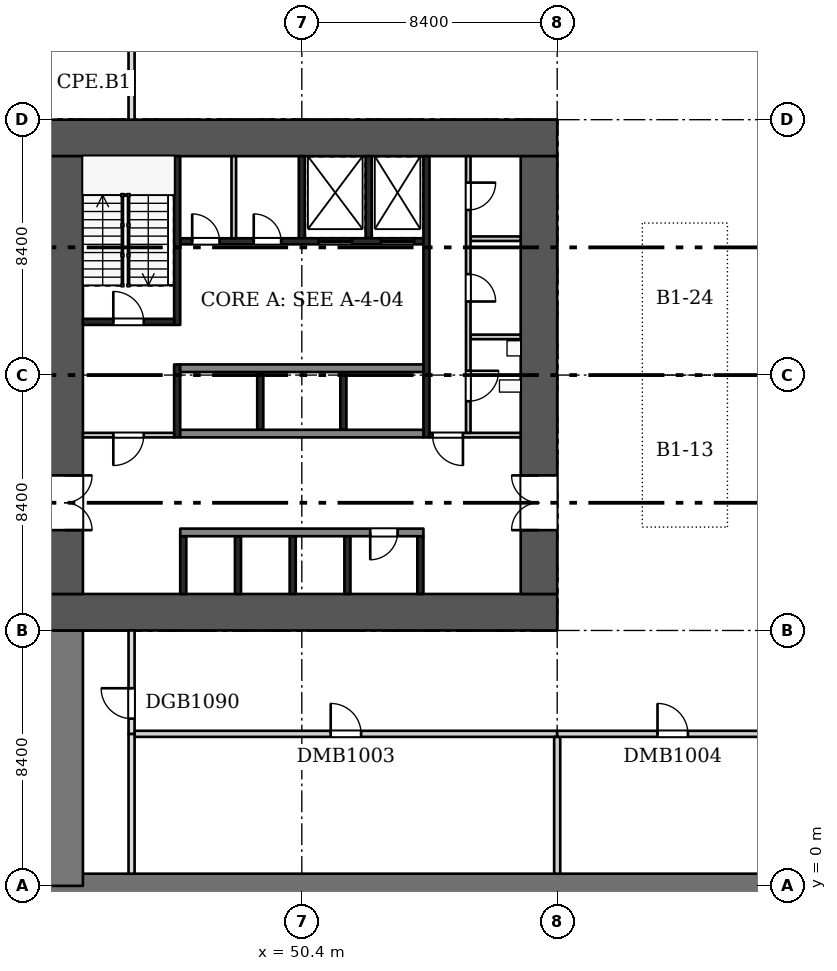
"""IFC4 building model, lengths in metres.
Left out: names, types, materials, properties, quantities, classifications, styles, units other than length and angle.
Written with IfcOpenShell. Run it as: python <this file> out.ifc"""

import sys

from ifc_helpers import new_model, si_unit, direction, frame, frame_2d, origin, place, context, subcontext, project, spatial, rectangle, extrude, element, fill, save


model = new_model("IFC4")
c1 = context("Model", 3, precision=1e-05, world=origin(), true_north=direction((0.0, 1.0)))
c2 = subcontext(c1, "Body", "Model", "MODEL_VIEW")
j1 = project(units=[si_unit("LENGTHUNIT", "METRE"), si_unit("PLANEANGLEUNIT", "RADIAN")], contexts=[c1])
p1 = place(None, origin())
s1 = spatial("IfcSite", under=j1, at=p1, CompositionType="ELEMENT")
p2 = place(p1, origin())
s2 = spatial("IfcBuilding", under=s1, at=p2, CompositionType="ELEMENT")
p3 = place(p2, frame((0.0, 0.0, -4.0)))
s3 = spatial("IfcBuildingStorey", under=s2, at=p3, CompositionType="ELEMENT", Elevation=-4.0)
p4 = place(p3, frame((-8.8, 0.0, 0.0), z_axis=(0.0, 0.0, 1.0), x_axis=(1.0, 0.0, 0.0)))
e1 = element("IfcWall", 1, at=p4, inside=s3, PredefinedType="SOLIDWALL", context=c2, shape_type="SweptSolid", body=[
    extrude(rectangle(XDim=76.0, YDim=0.8, at=frame_2d((38.0, 0.0))), origin(), (0.0, 0.0, 1.0), 3.6),
])
p5 = place(p3, frame((42.6, 0.0, 0.0), z_axis=(0.0, 0.0, 1.0), x_axis=(0.0, 1.0, 0.0)))
e2 = element("IfcWall", 2, at=p5, inside=s3, PredefinedType="SHEAR", context=c2, shape_type="SweptSolid", body=[
    extrude(rectangle(XDim=8.4, YDim=1.2, at=frame_2d((4.2, 0.0))), origin(), (0.0, 0.0, 1.0), 3.6),
])
for number, where, z_axis, x_axis in (
    (3, (42.0, 9.0, 0.0), (0.0, 0.0, 1.0), (1.0, 0.0, 0.0)),
    (4, (42.0, 24.6, 0.0), (0.0, 0.0, 1.0), (1.0, 0.0, 0.0)),
):
    element("IfcWall", number, at=place(p3, frame(where, z_axis=z_axis, x_axis=x_axis)), inside=s3, PredefinedType="SHEAR", context=c2, shape_type="SweptSolid", body=[
        extrude(rectangle(XDim=16.8, YDim=1.2, at=frame_2d((8.4, 0.0))), origin(), (0.0, 0.0, 1.0), 3.6),
    ])
p6 = place(p3, frame((42.6, 9.6, 0.0), z_axis=(0.0, 0.0, 1.0), x_axis=(0.0, 1.0, 0.0)))
e5 = element("IfcWall", 5, at=p6, inside=s3, PredefinedType="SHEAR", context=c2, shape_type="SweptSolid", body=[
    extrude(rectangle(XDim=14.4, YDim=1.2, at=frame_2d((7.2, 0.0))), origin(), (0.0, 0.0, 1.0), 3.6),
])
p7 = place(p6, frame((2.1, 0.0, 0.0)))
e6 = element("IfcOpeningElement", 6, at=p7, cuts=e5, PredefinedType="OPENING", context=c2, shape_type="SweptSolid", body=[
    extrude(rectangle(XDim=1.8, YDim=2.1, at=frame_2d((0.9, 1.05))), frame((0.0, 0.61, 0.0), z_axis=(0.0, -1.0, 0.0), x_axis=(1.0, 0.0, 0.0)), (0.0, 0.0, 1.0), 1.22),
])
p8 = place(p3, frame((58.2, 9.6, 0.0), z_axis=(0.0, 0.0, 1.0), x_axis=(0.0, 1.0, 0.0)))
e7 = element("IfcWall", 7, at=p8, inside=s3, PredefinedType="SHEAR", context=c2, shape_type="SweptSolid", body=[
    extrude(rectangle(XDim=14.4, YDim=1.2, at=frame_2d((7.2, 0.0))), origin(), (0.0, 0.0, 1.0), 3.6),
])
p9 = place(p8, frame((2.1, 0.0, 0.0)))
e8 = element("IfcOpeningElement", 8, at=p9, cuts=e7, PredefinedType="OPENING", context=c2, shape_type="SweptSolid", body=[
    extrude(rectangle(XDim=1.8, YDim=2.1, at=frame_2d((0.9, 1.05))), frame((0.0, 0.61, 0.0), z_axis=(0.0, -1.0, 0.0), x_axis=(1.0, 0.0, 0.0)), (0.0, 0.0, 1.0), 1.22),
])
for number, where, z_axis, x_axis in (
    (9, (46.5, 9.6, 0.0), (0.0, 0.0, 1.0), (0.0, 1.0, 0.0)),
    (10, (48.3, 9.6, 0.0), (0.0, 0.0, 1.0), (0.0, 1.0, 0.0)),
    (11, (50.1, 9.6, 0.0), (0.0, 0.0, 1.0), (0.0, 1.0, 0.0)),
    (12, (51.9, 9.6, 0.0), (0.0, 0.0, 1.0), (0.0, 1.0, 0.0)),
    (13, (54.3, 9.6, 0.0), (0.0, 0.0, 1.0), (0.0, 1.0, 0.0)),
):
    element("IfcWall", number, at=place(p3, frame(where, z_axis=z_axis, x_axis=x_axis)), inside=s3, PredefinedType="SHEAR", context=c2, shape_type="SweptSolid", body=[
        extrude(rectangle(XDim=1.9, YDim=0.2, at=frame_2d((0.95, 0.0))), origin(), (0.0, 0.0, 1.0), 3.6),
    ])
p10 = place(p3, frame((46.4, 11.625, 0.0), z_axis=(0.0, 0.0, 1.0), x_axis=(1.0, 0.0, 0.0)))
e14 = element("IfcWall", 14, at=p10, inside=s3, PredefinedType="SHEAR", context=c2, shape_type="SweptSolid", body=[
    extrude(rectangle(XDim=8.0, YDim=0.25, at=frame_2d((4.0, 0.0))), origin(), (0.0, 0.0, 1.0), 3.6),
])
p11 = place(p10, frame((6.25, 0.0, 0.0)))
e15 = element("IfcOpeningElement", 15, at=p11, cuts=e14, PredefinedType="OPENING", context=c2, shape_type="SweptSolid", body=[
    extrude(rectangle(XDim=0.9, YDim=2.1, at=frame_2d((0.45, 1.05))), frame((0.0, 0.135, 0.0), z_axis=(0.0, -1.0, 0.0), x_axis=(1.0, 0.0, 0.0)), (0.0, 0.0, 1.0), 0.27),
])
for number, where, z_axis, x_axis in (
    (16, (49.033, 15.0, 0.0), (0.0, 0.0, 1.0), (0.0, 1.0, 0.0)),
    (17, (51.767, 15.0, 0.0), (0.0, 0.0, 1.0), (0.0, 1.0, 0.0)),
):
    element("IfcWall", number, at=place(p3, frame(where, z_axis=z_axis, x_axis=x_axis)), inside=s3, PredefinedType="SHEAR", context=c2, shape_type="SweptSolid", body=[
        extrude(rectangle(XDim=1.9, YDim=0.2, at=frame_2d((0.95, 0.0))), origin(), (0.0, 0.0, 1.0), 3.6),
    ])
for number, where, z_axis, x_axis in (
    (18, (46.4, 14.875, 0.0), (0.0, 0.0, 1.0), (1.0, 0.0, 0.0)),
    (19, (46.4, 17.025, 0.0), (0.0, 0.0, 1.0), (1.0, 0.0, 0.0)),
):
    element("IfcWall", number, at=place(p3, frame(where, z_axis=z_axis, x_axis=x_axis)), inside=s3, PredefinedType="SHEAR", context=c2, shape_type="SweptSolid", body=[
        extrude(rectangle(XDim=8.0, YDim=0.25, at=frame_2d((4.0, 0.0))), origin(), (0.0, 0.0, 1.0), 3.6),
    ])
for number, where, z_axis, x_axis in (
    (20, (50.4, 21.3, 0.0), (0.0, 0.0, 1.0), (0.0, 1.0, 0.0)),
    (21, (52.6, 21.3, 0.0), (0.0, 0.0, 1.0), (0.0, 1.0, 0.0)),
):
    element("IfcWall", number, at=place(p3, frame(where, z_axis=z_axis, x_axis=x_axis)), inside=s3, PredefinedType="SHEAR", context=c2, shape_type="SweptSolid", body=[
        extrude(rectangle(XDim=2.7, YDim=0.2, at=frame_2d((1.35, 0.0))), origin(), (0.0, 0.0, 1.0), 3.6),
    ])
p12 = place(p3, frame((48.163, 21.3, 0.0), z_axis=(0.0, 0.0, 1.0), x_axis=(0.0, 1.0, 0.0)))
e22 = element("IfcWall", 22, at=p12, inside=s3, PredefinedType="PARTITIONING", context=c2, shape_type="SweptSolid", body=[
    extrude(rectangle(XDim=2.7, YDim=0.15, at=frame_2d((1.35, 0.0))), origin(), (0.0, 0.0, 1.0), 3.6),
])
p13 = place(p3, frame((46.4, 21.2, 0.0), z_axis=(0.0, 0.0, 1.0), x_axis=(1.0, 0.0, 0.0)))
e23 = element("IfcWall", 23, at=p13, inside=s3, PredefinedType="SHEAR", context=c2, shape_type="SweptSolid", body=[
    extrude(rectangle(XDim=8.0, YDim=0.2, at=frame_2d((4.0, 0.0))), origin(), (0.0, 0.0, 1.0), 3.6),
])
p14 = place(p13, frame((0.394, 0.0, 0.0)))
e24 = element("IfcOpeningElement", 24, at=p14, cuts=e23, PredefinedType="OPENING", context=c2, shape_type="SweptSolid", body=[
    extrude(rectangle(XDim=0.9, YDim=2.1, at=frame_2d((0.45, 1.05))), frame((0.0, 0.11, 0.0), z_axis=(0.0, -1.0, 0.0), x_axis=(1.0, 0.0, 0.0)), (0.0, 0.0, 1.0), 0.22),
])
p15 = place(p13, frame((2.419, 0.0, 0.0)))
e25 = element("IfcOpeningElement", 25, at=p15, cuts=e23, PredefinedType="OPENING", context=c2, shape_type="SweptSolid", body=[
    extrude(rectangle(XDim=0.9, YDim=2.1, at=frame_2d((0.45, 1.05))), frame((0.0, 0.11, 0.0), z_axis=(0.0, -1.0, 0.0), x_axis=(1.0, 0.0, 0.0)), (0.0, 0.0, 1.0), 0.22),
])
p16 = place(p13, frame((4.55, 0.0, 0.0)))
e26 = element("IfcOpeningElement", 26, at=p16, cuts=e23, PredefinedType="OPENING", context=c2, shape_type="SweptSolid", body=[
    extrude(rectangle(XDim=1.1, YDim=2.1, at=frame_2d((0.55, 1.05))), frame((0.0, 0.11, 0.0), z_axis=(0.0, -1.0, 0.0), x_axis=(1.0, 0.0, 0.0)), (0.0, 0.0, 1.0), 0.22),
])
p17 = place(p13, frame((6.6, 0.0, 0.0)))
e27 = element("IfcOpeningElement", 27, at=p17, cuts=e23, PredefinedType="OPENING", context=c2, shape_type="SweptSolid", body=[
    extrude(rectangle(XDim=1.1, YDim=2.1, at=frame_2d((0.55, 1.05))), frame((0.0, 0.11, 0.0), z_axis=(0.0, -1.0, 0.0), x_axis=(1.0, 0.0, 0.0)), (0.0, 0.0, 1.0), 0.22),
])
p18 = place(p3, frame((46.3, 14.75, 0.0), z_axis=(0.0, 0.0, 1.0), x_axis=(0.0, 1.0, 0.0)))
e28 = element("IfcWall", 28, at=p18, inside=s3, PredefinedType="SHEAR", context=c2, shape_type="SweptSolid", body=[
    extrude(rectangle(XDim=2.4, YDim=0.2, at=frame_2d((1.2, 0.0))), origin(), (0.0, 0.0, 1.0), 3.6),
])
p19 = place(p3, frame((46.3, 18.45, 0.0), z_axis=(0.0, 0.0, 1.0), x_axis=(0.0, 1.0, 0.0)))
e29 = element("IfcWall", 29, at=p19, inside=s3, PredefinedType="SHEAR", context=c2, shape_type="SweptSolid", body=[
    extrude(rectangle(XDim=5.55, YDim=0.2, at=frame_2d((2.775, 0.0))), origin(), (0.0, 0.0, 1.0), 3.6),
])
p20 = place(p3, frame((43.2, 14.825, 0.0), z_axis=(0.0, 0.0, 1.0), x_axis=(1.0, 0.0, 0.0)))
e30 = element("IfcWall", 30, at=p20, inside=s3, PredefinedType="PARTITIONING", context=c2, shape_type="SweptSolid", body=[
    extrude(rectangle(XDim=3.0, YDim=0.15, at=frame_2d((1.5, 0.0))), origin(), (0.0, 0.0, 1.0), 3.6),
])
p21 = place(p20, frame((1.0, 0.0, 0.0)))
e31 = element("IfcOpeningElement", 31, at=p21, cuts=e30, PredefinedType="OPENING", context=c2, shape_type="SweptSolid", body=[
    extrude(rectangle(XDim=1.0, YDim=2.1, at=frame_2d((0.5, 1.05))), frame((0.0, 0.085, 0.0), z_axis=(0.0, -1.0, 0.0), x_axis=(1.0, 0.0, 0.0)), (0.0, 0.0, 1.0), 0.17),
])
p22 = place(p3, frame((43.2, 18.55, 0.0), z_axis=(0.0, 0.0, 1.0), x_axis=(1.0, 0.0, 0.0)))
e32 = element("IfcWall", 32, at=p22, inside=s3, PredefinedType="SHEAR", context=c2, shape_type="SweptSolid", body=[
    extrude(rectangle(XDim=3.0, YDim=0.2, at=frame_2d((1.5, 0.0))), origin(), (0.0, 0.0, 1.0), 3.6),
])
p23 = place(p22, frame((1.0, 0.0, 0.0)))
e33 = element("IfcOpeningElement", 33, at=p23, cuts=e32, PredefinedType="OPENING", context=c2, shape_type="SweptSolid", body=[
    extrude(rectangle(XDim=1.0, YDim=2.1, at=frame_2d((0.5, 1.05))), frame((0.0, 0.11, 0.0), z_axis=(0.0, -1.0, 0.0), x_axis=(1.0, 0.0, 0.0)), (0.0, 0.0, 1.0), 0.22),
])
p24 = place(p3, frame((54.5, 14.75, 0.0), z_axis=(0.0, 0.0, 1.0), x_axis=(0.0, 1.0, 0.0)))
e34 = element("IfcWall", 34, at=p24, inside=s3, PredefinedType="SHEAR", context=c2, shape_type="SweptSolid", body=[
    extrude(rectangle(XDim=9.25, YDim=0.2, at=frame_2d((4.625, 0.0))), origin(), (0.0, 0.0, 1.0), 3.6),
])
p25 = place(p3, frame((54.6, 14.825, 0.0), z_axis=(0.0, 0.0, 1.0), x_axis=(1.0, 0.0, 0.0)))
e35 = element("IfcWall", 35, at=p25, inside=s3, PredefinedType="PARTITIONING", context=c2, shape_type="SweptSolid", body=[
    extrude(rectangle(XDim=3.0, YDim=0.15, at=frame_2d((1.5, 0.0))), origin(), (0.0, 0.0, 1.0), 3.6),
])
p26 = place(p25, frame((0.1, 0.0, 0.0)))
e36 = element("IfcOpeningElement", 36, at=p26, cuts=e35, PredefinedType="OPENING", context=c2, shape_type="SweptSolid", body=[
    extrude(rectangle(XDim=1.0, YDim=2.1, at=frame_2d((0.5, 1.05))), frame((0.0, 0.085, 0.0), z_axis=(0.0, -1.0, 0.0), x_axis=(1.0, 0.0, 0.0)), (0.0, 0.0, 1.0), 0.17),
])
for number, where, z_axis, x_axis in (
    (37, (55.95, 18.055, 0.0), (0.0, 0.0, 1.0), (1.0, 0.0, 0.0)),
    (38, (55.95, 21.285, 0.0), (0.0, 0.0, 1.0), (1.0, 0.0, 0.0)),
):
    element("IfcWall", number, at=place(p3, frame(where, z_axis=z_axis, x_axis=x_axis)), inside=s3, PredefinedType="PARTITIONING", context=c2, shape_type="SweptSolid", body=[
        extrude(rectangle(XDim=1.65, YDim=0.15, at=frame_2d((0.825, 0.0))), origin(), (0.0, 0.0, 1.0), 3.6),
    ])
p27 = place(p3, frame((55.875, 14.9, 0.0), z_axis=(0.0, 0.0, 1.0), x_axis=(0.0, 1.0, 0.0)))
e39 = element("IfcWall", 39, at=p27, inside=s3, PredefinedType="PARTITIONING", context=c2, shape_type="SweptSolid", body=[
    extrude(rectangle(XDim=9.1, YDim=0.15, at=frame_2d((4.55, 0.0))), origin(), (0.0, 0.0, 1.0), 3.6),
])
p28 = place(p27, frame((1.04, 0.0, 0.0)))
e40 = element("IfcOpeningElement", 40, at=p28, cuts=e39, PredefinedType="OPENING", context=c2, shape_type="SweptSolid", body=[
    extrude(rectangle(XDim=1.0, YDim=2.1, at=frame_2d((0.5, 1.05))), frame((0.0, 0.085, 0.0), z_axis=(0.0, -1.0, 0.0), x_axis=(1.0, 0.0, 0.0)), (0.0, 0.0, 1.0), 0.17),
])
p29 = place(p27, frame((4.32, 0.0, 0.0)))
e41 = element("IfcOpeningElement", 41, at=p29, cuts=e39, PredefinedType="OPENING", context=c2, shape_type="SweptSolid", body=[
    extrude(rectangle(XDim=0.9, YDim=2.1, at=frame_2d((0.45, 1.05))), frame((0.0, 0.085, 0.0), z_axis=(0.0, -1.0, 0.0), x_axis=(1.0, 0.0, 0.0)), (0.0, 0.0, 1.0), 0.17),
])
p30 = place(p27, frame((7.33, 0.0, 0.0)))
e42 = element("IfcOpeningElement", 42, at=p30, cuts=e39, PredefinedType="OPENING", context=c2, shape_type="SweptSolid", body=[
    extrude(rectangle(XDim=0.9, YDim=2.1, at=frame_2d((0.45, 1.05))), frame((0.0, 0.085, 0.0), z_axis=(0.0, -1.0, 0.0), x_axis=(1.0, 0.0, 0.0)), (0.0, 0.0, 1.0), 0.17),
])
p31 = place(p3, frame((44.9, 5.0, 0.0), z_axis=(0.0, 0.0, 1.0), x_axis=(1.0, 0.0, 0.0)))
e43 = element("IfcWall", 43, at=p31, inside=s3, PredefinedType="PARTITIONING", context=c2, shape_type="SweptSolid", body=[
    extrude(rectangle(XDim=13.9, YDim=0.2, at=frame_2d((6.95, 0.0))), origin(), (0.0, 0.0, 1.0), 3.6),
])
p32 = place(p31, frame((6.45, 0.0, 0.0)))
e44 = element("IfcOpeningElement", 44, at=p32, cuts=e43, PredefinedType="OPENING", context=c2, shape_type="SweptSolid", body=[
    extrude(rectangle(XDim=1.0, YDim=2.1, at=frame_2d((0.5, 1.05))), frame((0.0, 0.11, 0.0), z_axis=(0.0, -1.0, 0.0), x_axis=(1.0, 0.0, 0.0)), (0.0, 0.0, 1.0), 0.22),
])
p33 = place(p3, frame((58.8, 0.4, 0.0), z_axis=(0.0, 0.0, 1.0), x_axis=(0.0, 1.0, 0.0)))
e45 = element("IfcWall", 45, at=p33, inside=s3, PredefinedType="PARTITIONING", context=c2, shape_type="SweptSolid", body=[
    extrude(rectangle(XDim=4.5, YDim=0.2, at=frame_2d((2.25, 0.0))), origin(), (0.0, 0.0, 1.0), 3.6),
])
p34 = place(p3, frame((58.8, 5.0, 0.0), z_axis=(0.0, 0.0, 1.0), x_axis=(1.0, 0.0, 0.0)))
e46 = element("IfcWall", 46, at=p34, inside=s3, PredefinedType="PARTITIONING", context=c2, shape_type="SweptSolid", body=[
    extrude(rectangle(XDim=7.6, YDim=0.2, at=frame_2d((3.8, 0.0))), origin(), (0.0, 0.0, 1.0), 3.6),
])
p35 = place(p34, frame((3.3, 0.0, 0.0)))
e47 = element("IfcOpeningElement", 47, at=p35, cuts=e46, PredefinedType="OPENING", context=c2, shape_type="SweptSolid", body=[
    extrude(rectangle(XDim=1.0, YDim=2.1, at=frame_2d((0.5, 1.05))), frame((0.0, 0.11, 0.0), z_axis=(0.0, -1.0, 0.0), x_axis=(1.0, 0.0, 0.0)), (0.0, 0.0, 1.0), 0.22),
])
p36 = place(p3, frame((44.8, 0.4, 0.0), z_axis=(0.0, 0.0, 1.0), x_axis=(0.0, 1.0, 0.0)))
e48 = element("IfcWall", 48, at=p36, inside=s3, PredefinedType="PARTITIONING", context=c2, shape_type="SweptSolid", body=[
    extrude(rectangle(XDim=4.6, YDim=0.2, at=frame_2d((2.3, 0.0))), origin(), (0.0, 0.0, 1.0), 3.6),
])
p37 = place(p3, frame((44.8, 5.0, 0.0), z_axis=(0.0, 0.0, 1.0), x_axis=(0.0, 1.0, 0.0)))
e49 = element("IfcWall", 49, at=p37, inside=s3, PredefinedType="PARTITIONING", context=c2, shape_type="SweptSolid", body=[
    extrude(rectangle(XDim=3.4, YDim=0.2, at=frame_2d((1.7, 0.0))), origin(), (0.0, 0.0, 1.0), 3.6),
])
p38 = place(p37, frame((0.5, 0.0, 0.0)))
e50 = element("IfcOpeningElement", 50, at=p38, cuts=e49, PredefinedType="OPENING", context=c2, shape_type="SweptSolid", body=[
    extrude(rectangle(XDim=1.0, YDim=2.1, at=frame_2d((0.5, 1.05))), frame((0.0, 0.11, 0.0), z_axis=(0.0, -1.0, 0.0), x_axis=(1.0, 0.0, 0.0)), (0.0, 0.0, 1.0), 0.22),
])
p39 = place(p3, frame((44.8, 25.2, 0.0), z_axis=(0.0, 0.0, 1.0), x_axis=(0.0, 1.0, 0.0)))
e51 = element("IfcWall", 51, at=p39, inside=s3, PredefinedType="PARTITIONING", context=c2, shape_type="SweptSolid", body=[
    extrude(rectangle(XDim=3.4, YDim=0.2, at=frame_2d((1.7, 0.0))), origin(), (0.0, 0.0, 1.0), 3.6),
])
p40 = place(p7, frame((1.8, 0.0, 0.0), z_axis=(0.0, 0.0, 1.0), x_axis=(-1.0, 0.0, 0.0)))
e52 = element("IfcDoor", 52, at=p40, inside=s3, OperationType="DOUBLE_DOOR_SINGLE_SWING", PredefinedType="DOOR", context=c2, shape_type="SweptSolid", body=[
    extrude(rectangle(XDim=1.8, YDim=2.1, at=frame_2d((0.9, 1.05))), frame((0.0, 0.025, 0.0), z_axis=(0.0, -1.0, 0.0), x_axis=(1.0, 0.0, 0.0)), (0.0, 0.0, 1.0), 0.05),
])
fill(e6, e52)
p41 = place(p9, origin())
e53 = element("IfcDoor", 53, at=p41, inside=s3, OperationType="DOUBLE_DOOR_SINGLE_SWING", PredefinedType="DOOR", context=c2, shape_type="SweptSolid", body=[
    extrude(rectangle(XDim=1.8, YDim=2.1, at=frame_2d((0.9, 1.05))), frame((0.0, 0.025, 0.0), z_axis=(0.0, -1.0, 0.0), x_axis=(1.0, 0.0, 0.0)), (0.0, 0.0, 1.0), 0.05),
])
fill(e8, e53)
p42 = place(p11, frame((0.9, 0.0, 0.0), z_axis=(0.0, 0.0, 1.0), x_axis=(-1.0, 0.0, 0.0)))
e54 = element("IfcDoor", 54, at=p42, inside=s3, OperationType="SINGLE_SWING_RIGHT", PredefinedType="DOOR", context=c2, shape_type="SweptSolid", body=[
    extrude(rectangle(XDim=0.9, YDim=2.1, at=frame_2d((0.45, 1.05))), frame((0.0, 0.025, 0.0), z_axis=(0.0, -1.0, 0.0), x_axis=(1.0, 0.0, 0.0)), (0.0, 0.0, 1.0), 0.05),
])
fill(e15, e54)
p43 = place(p14, origin())
e55 = element("IfcDoor", 55, at=p43, inside=s3, OperationType="SINGLE_SWING_LEFT", PredefinedType="DOOR", context=c2, shape_type="SweptSolid", body=[
    extrude(rectangle(XDim=0.9, YDim=2.1, at=frame_2d((0.45, 1.05))), frame((0.0, 0.025, 0.0), z_axis=(0.0, -1.0, 0.0), x_axis=(1.0, 0.0, 0.0)), (0.0, 0.0, 1.0), 0.05),
])
fill(e24, e55)
p44 = place(p15, origin())
e56 = element("IfcDoor", 56, at=p44, inside=s3, OperationType="SINGLE_SWING_LEFT", PredefinedType="DOOR", context=c2, shape_type="SweptSolid", body=[
    extrude(rectangle(XDim=0.9, YDim=2.1, at=frame_2d((0.45, 1.05))), frame((0.0, 0.025, 0.0), z_axis=(0.0, -1.0, 0.0), x_axis=(1.0, 0.0, 0.0)), (0.0, 0.0, 1.0), 0.05),
])
fill(e25, e56)
p45 = place(p16, origin())
e57 = element("IfcDoor", 57, at=p45, inside=s3, OperationType="DOUBLE_DOOR_SLIDING", PredefinedType="DOOR", context=c2, shape_type="SweptSolid", body=[
    extrude(rectangle(XDim=1.1, YDim=2.1, at=frame_2d((0.55, 1.05))), frame((0.0, 0.025, 0.0), z_axis=(0.0, -1.0, 0.0), x_axis=(1.0, 0.0, 0.0)), (0.0, 0.0, 1.0), 0.05),
])
fill(e26, e57)
p46 = place(p17, origin())
e58 = element("IfcDoor", 58, at=p46, inside=s3, OperationType="DOUBLE_DOOR_SLIDING", PredefinedType="DOOR", context=c2, shape_type="SweptSolid", body=[
    extrude(rectangle(XDim=1.1, YDim=2.1, at=frame_2d((0.55, 1.05))), frame((0.0, 0.025, 0.0), z_axis=(0.0, -1.0, 0.0), x_axis=(1.0, 0.0, 0.0)), (0.0, 0.0, 1.0), 0.05),
])
fill(e27, e58)
p47 = place(p21, frame((1.0, 0.0, 0.0), z_axis=(0.0, 0.0, 1.0), x_axis=(-1.0, 0.0, 0.0)))
e59 = element("IfcDoor", 59, at=p47, inside=s3, OperationType="SINGLE_SWING_RIGHT", PredefinedType="DOOR", context=c2, shape_type="SweptSolid", body=[
    extrude(rectangle(XDim=1.0, YDim=2.1, at=frame_2d((0.5, 1.05))), frame((0.0, 0.025, 0.0), z_axis=(0.0, -1.0, 0.0), x_axis=(1.0, 0.0, 0.0)), (0.0, 0.0, 1.0), 0.05),
])
fill(e31, e59)
p48 = place(p23, origin())
e60 = element("IfcDoor", 60, at=p48, inside=s3, OperationType="SINGLE_SWING_LEFT", PredefinedType="DOOR", context=c2, shape_type="SweptSolid", body=[
    extrude(rectangle(XDim=1.0, YDim=2.1, at=frame_2d((0.5, 1.05))), frame((0.0, 0.025, 0.0), z_axis=(0.0, -1.0, 0.0), x_axis=(1.0, 0.0, 0.0)), (0.0, 0.0, 1.0), 0.05),
])
fill(e33, e60)
p49 = place(p26, frame((1.0, 0.0, 0.0), z_axis=(0.0, 0.0, 1.0), x_axis=(-1.0, 0.0, 0.0)))
e61 = element("IfcDoor", 61, at=p49, inside=s3, OperationType="SINGLE_SWING_LEFT", PredefinedType="DOOR", context=c2, shape_type="SweptSolid", body=[
    extrude(rectangle(XDim=1.0, YDim=2.1, at=frame_2d((0.5, 1.05))), frame((0.0, 0.025, 0.0), z_axis=(0.0, -1.0, 0.0), x_axis=(1.0, 0.0, 0.0)), (0.0, 0.0, 1.0), 0.05),
])
fill(e36, e61)
p50 = place(p28, frame((1.0, 0.0, 0.0), z_axis=(0.0, 0.0, 1.0), x_axis=(-1.0, 0.0, 0.0)))
e62 = element("IfcDoor", 62, at=p50, inside=s3, OperationType="SINGLE_SWING_LEFT", PredefinedType="DOOR", context=c2, shape_type="SweptSolid", body=[
    extrude(rectangle(XDim=1.0, YDim=2.1, at=frame_2d((0.5, 1.05))), frame((0.0, 0.025, 0.0), z_axis=(0.0, -1.0, 0.0), x_axis=(1.0, 0.0, 0.0)), (0.0, 0.0, 1.0), 0.05),
])
fill(e40, e62)
p51 = place(p29, frame((0.9, 0.0, 0.0), z_axis=(0.0, 0.0, 1.0), x_axis=(-1.0, 0.0, 0.0)))
e63 = element("IfcDoor", 63, at=p51, inside=s3, OperationType="SINGLE_SWING_RIGHT", PredefinedType="DOOR", context=c2, shape_type="SweptSolid", body=[
    extrude(rectangle(XDim=0.9, YDim=2.1, at=frame_2d((0.45, 1.05))), frame((0.0, 0.025, 0.0), z_axis=(0.0, -1.0, 0.0), x_axis=(1.0, 0.0, 0.0)), (0.0, 0.0, 1.0), 0.05),
])
fill(e41, e63)
p52 = place(p30, frame((0.9, 0.0, 0.0), z_axis=(0.0, 0.0, 1.0), x_axis=(-1.0, 0.0, 0.0)))
e64 = element("IfcDoor", 64, at=p52, inside=s3, OperationType="SINGLE_SWING_LEFT", PredefinedType="DOOR", context=c2, shape_type="SweptSolid", body=[
    extrude(rectangle(XDim=0.9, YDim=2.1, at=frame_2d((0.45, 1.05))), frame((0.0, 0.025, 0.0), z_axis=(0.0, -1.0, 0.0), x_axis=(1.0, 0.0, 0.0)), (0.0, 0.0, 1.0), 0.05),
])
fill(e42, e64)
p53 = place(p32, origin())
e65 = element("IfcDoor", 65, at=p53, inside=s3, OperationType="SINGLE_SWING_LEFT", PredefinedType="DOOR", context=c2, shape_type="SweptSolid", body=[
    extrude(rectangle(XDim=1.0, YDim=2.1, at=frame_2d((0.5, 1.05))), frame((0.0, 0.025, 0.0), z_axis=(0.0, -1.0, 0.0), x_axis=(1.0, 0.0, 0.0)), (0.0, 0.0, 1.0), 0.05),
])
fill(e44, e65)
p54 = place(p35, origin())
e66 = element("IfcDoor", 66, at=p54, inside=s3, OperationType="SINGLE_SWING_LEFT", PredefinedType="DOOR", context=c2, shape_type="SweptSolid", body=[
    extrude(rectangle(XDim=1.0, YDim=2.1, at=frame_2d((0.5, 1.05))), frame((0.0, 0.025, 0.0), z_axis=(0.0, -1.0, 0.0), x_axis=(1.0, 0.0, 0.0)), (0.0, 0.0, 1.0), 0.05),
])
fill(e47, e66)
p55 = place(p38, origin())
e67 = element("IfcDoor", 67, at=p55, inside=s3, OperationType="SINGLE_SWING_RIGHT", PredefinedType="DOOR", context=c2, shape_type="SweptSolid", body=[
    extrude(rectangle(XDim=1.0, YDim=2.1, at=frame_2d((0.5, 1.05))), frame((0.0, 0.025, 0.0), z_axis=(0.0, -1.0, 0.0), x_axis=(1.0, 0.0, 0.0)), (0.0, 0.0, 1.0), 0.05),
])
fill(e50, e67)
save(model, sys.argv[1])
